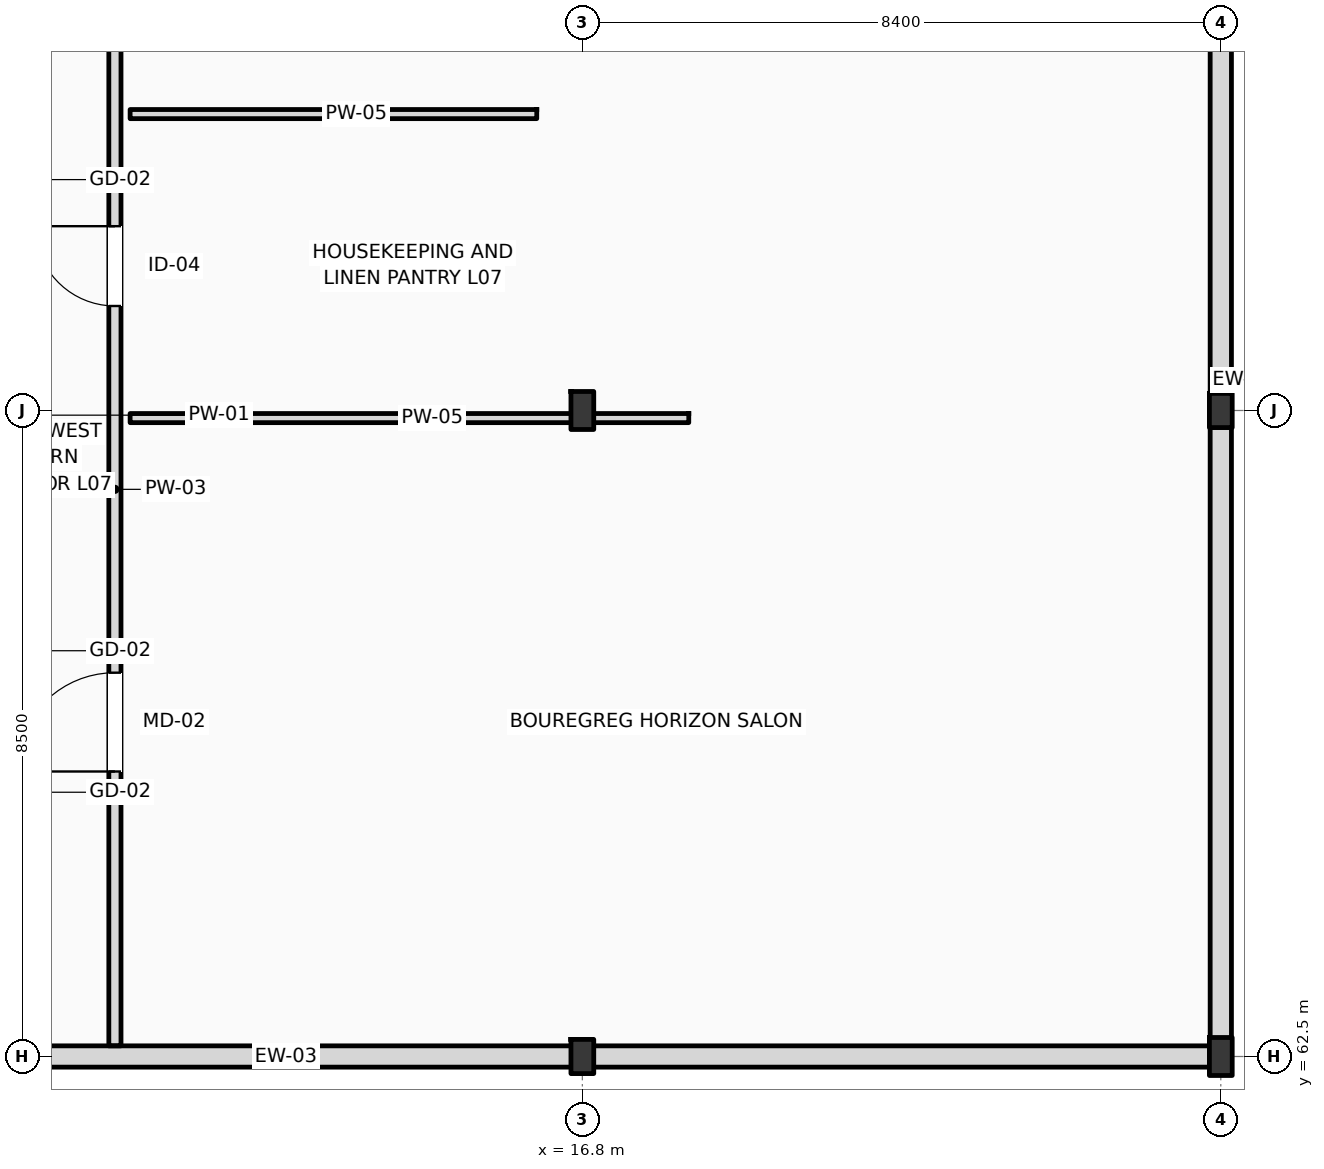
"""IFC4 building model, lengths in metres.
Left out: names, types, materials, properties, quantities, classifications, styles, units other than length and angle.
Written with IfcOpenShell. Run it as: python <this file> out.ifc"""

import sys

from ifc_helpers import new_model, si_unit, direction, frame, frame_2d, origin, origin_2d, place, context, subcontext, project, spatial, rectangle, i_section, extrude, element, fill, save


model = new_model("IFC4")
c1 = context("Model", 3, precision=1e-05, world=origin(), true_north=direction((0.0, 1.0)))
c2 = subcontext(c1, "Body", "Model", "MODEL_VIEW")
j1 = project(units=[si_unit("LENGTHUNIT", "METRE"), si_unit("PLANEANGLEUNIT", "RADIAN")], contexts=[c1])
p1 = place(None, origin())
s1 = spatial("IfcSite", under=j1, at=p1, CompositionType="ELEMENT")
p2 = place(p1, origin())
s2 = spatial("IfcBuilding", under=s1, at=p2, CompositionType="ELEMENT")
p3 = place(p2, frame((0.0, 0.0, 31.8)))
s3 = spatial("IfcBuildingStorey", under=s2, at=p3, CompositionType="ELEMENT", Elevation=31.8)
p4 = place(p3, frame((16.8, 62.5, 0.0), z_axis=(0.0, 0.0, 1.0), x_axis=(1.0, 0.0, 0.0)))
e1 = element("IfcColumn", 1, at=p4, inside=s3, PredefinedType="COLUMN", context=c2, shape_type="SweptSolid", body=[
    extrude(i_section(OverallWidth=0.3, OverallDepth=0.45, WebThickness=0.014, FlangeThickness=0.026, FilletRadius=0.027, at=origin_2d()), origin(), (0.0, 0.0, 1.0), 3.6),
])
for number, where, z_axis, x_axis in (
    (2, (16.8, 71.0, 0.0), (0.0, 0.0, 1.0), (1.0, 0.0, 0.0)),
    (3, (25.2, 62.5, 0.0), (0.0, 0.0, 1.0), (1.0, 0.0, 0.0)),
):
    element("IfcColumn", number, at=place(p3, frame(where, z_axis=z_axis, x_axis=x_axis)), inside=s3, PredefinedType="COLUMN", context=c2, shape_type="SweptSolid", body=[
        extrude(i_section(OverallWidth=0.3, OverallDepth=0.5, WebThickness=0.014, FlangeThickness=0.028, FilletRadius=0.027, at=origin_2d()), origin(), (0.0, 0.0, 1.0), 3.6),
    ])
p5 = place(p3, frame((25.2, 71.0, 0.0), z_axis=(0.0, 0.0, 1.0), x_axis=(1.0, 0.0, 0.0)))
e4 = element("IfcColumn", 4, at=p5, inside=s3, PredefinedType="COLUMN", context=c2, shape_type="SweptSolid", body=[
    extrude(i_section(OverallWidth=0.3, OverallDepth=0.45, WebThickness=0.014, FlangeThickness=0.026, FilletRadius=0.027, at=origin_2d()), origin(), (0.0, 0.0, 1.0), 3.6),
])
p6 = place(p3, frame((0.0, 62.5, 0.0), z_axis=(0.0, 0.0, 1.0), x_axis=(1.0, 0.0, 0.0)))
e5 = element("IfcWall", 5, at=p6, inside=s3, PredefinedType="STANDARD", context=c2, shape_type="SweptSolid", body=[
    extrude(rectangle(XDim=25.2, YDim=0.28, at=frame_2d((12.6, 0.0))), origin(), (0.0, 0.0, 1.0), 2.8),
])
p7 = place(p3, frame((25.2, 62.5, 0.0), z_axis=(0.0, 0.0, 1.0), x_axis=(0.0, 1.0, 0.0)))
e6 = element("IfcWall", 6, at=p7, inside=s3, PredefinedType="STANDARD", context=c2, shape_type="SweptSolid", body=[
    extrude(rectangle(XDim=17.0, YDim=0.28, at=frame_2d((8.5, 0.0))), origin(), (0.0, 0.0, 1.0), 2.99),
])
p8 = place(p3, frame((10.65, 62.64, 0.0), z_axis=(0.0, 0.0, 1.0), x_axis=(0.0, 1.0, 0.0)))
e7 = element("IfcWall", 7, at=p8, inside=s3, PredefinedType="PARTITIONING", context=c2, shape_type="SweptSolid", body=[
    extrude(rectangle(XDim=16.31, YDim=0.16, at=frame_2d((8.155, 0.0))), origin(), (0.0, 0.0, 1.0), 3.36),
])
p9 = place(p8, frame((3.61, 0.0, 0.0)))
e8 = element("IfcOpeningElement", 8, at=p9, cuts=e7, PredefinedType="OPENING", context=c2, shape_type="SweptSolid", body=[
    extrude(rectangle(XDim=1.3, YDim=2.2, at=frame_2d((0.65, 1.1))), frame((0.0, 0.09, 0.0), z_axis=(0.0, -1.0, 0.0), x_axis=(1.0, 0.0, 0.0)), (0.0, 0.0, 1.0), 0.18),
])
p10 = place(p8, frame((9.735, 0.0, 0.0)))
e9 = element("IfcOpeningElement", 9, at=p10, cuts=e7, PredefinedType="OPENING", context=c2, shape_type="SweptSolid", body=[
    extrude(rectangle(XDim=1.05, YDim=2.12, at=frame_2d((0.525, 1.06))), frame((0.0, 0.09, 0.0), z_axis=(0.0, -1.0, 0.0), x_axis=(1.0, 0.0, 0.0)), (0.0, 0.0, 1.0), 0.18),
])
p11 = place(p8, frame((13.49, 0.0, 0.0)))
e10 = element("IfcOpeningElement", 10, at=p11, cuts=e7, PredefinedType="OPENING", context=c2, shape_type="SweptSolid", body=[
    extrude(rectangle(XDim=0.94, YDim=2.15, at=frame_2d((0.47, 1.075))), frame((0.0, 0.09, 0.0), z_axis=(0.0, -1.0, 0.0), x_axis=(1.0, 0.0, 0.0)), (0.0, 0.0, 1.0), 0.18),
])
p12 = place(p3, frame((10.85, 70.9, 0.0), z_axis=(0.0, 0.0, 1.0), x_axis=(1.0, 0.0, 0.0)))
e11 = element("IfcWall", 11, at=p12, inside=s3, PredefinedType="PARTITIONING", context=c2, shape_type="SweptSolid", body=[
    extrude(rectangle(XDim=7.35, YDim=0.12, at=frame_2d((3.675, 0.0))), origin(), (0.0, 0.0, 1.0), 2.8),
])
p13 = place(p3, frame((10.85, 74.9, 0.0), z_axis=(0.0, 0.0, 1.0), x_axis=(1.0, 0.0, 0.0)))
e12 = element("IfcWall", 12, at=p13, inside=s3, PredefinedType="PARTITIONING", context=c2, shape_type="SweptSolid", body=[
    extrude(rectangle(XDim=5.35, YDim=0.12, at=frame_2d((2.675, 0.0))), origin(), (0.0, 0.0, 1.0), 3.36),
])
p14 = place(p9, origin())
e13 = element("IfcDoor", 13, at=p14, inside=s3, OperationType="SINGLE_SWING_LEFT", PredefinedType="DOOR", context=c2, shape_type="SweptSolid", body=[
    extrude(rectangle(XDim=1.3, YDim=2.2, at=frame_2d((0.65, 1.1))), frame((0.0, 0.025, 0.0), z_axis=(0.0, -1.0, 0.0), x_axis=(1.0, 0.0, 0.0)), (0.0, 0.0, 1.0), 0.05),
])
fill(e8, e13)
p15 = place(p10, origin())
e14 = element("IfcDoor", 14, at=p15, inside=s3, OperationType="SINGLE_SWING_RIGHT", PredefinedType="DOOR", context=c2, shape_type="SweptSolid", body=[
    extrude(rectangle(XDim=1.05, YDim=2.12, at=frame_2d((0.525, 1.06))), frame((0.0, 0.025, 0.0), z_axis=(0.0, -1.0, 0.0), x_axis=(1.0, 0.0, 0.0)), (0.0, 0.0, 1.0), 0.05),
])
fill(e9, e14)
save(model, sys.argv[1])
